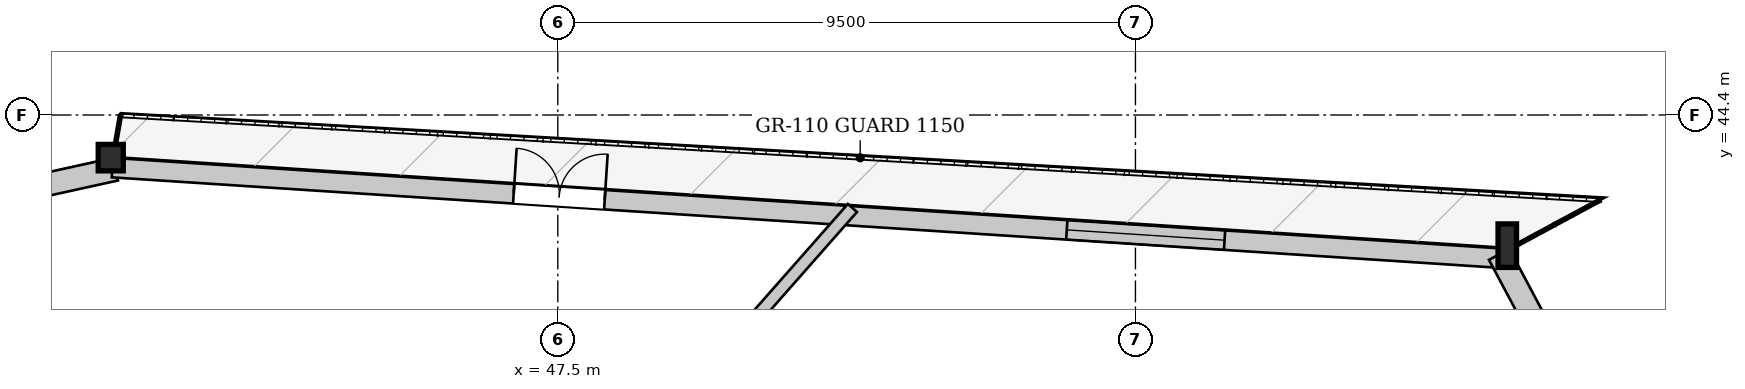
"""IFC4 building model, lengths in metres.
Left out: names, types, materials, properties, quantities, classifications, styles, units other than length and angle.
Written with IfcOpenShell. Run it as: python <this file> out.ifc"""

import sys

from ifc_helpers import new_model, si_unit, direction, frame, frame_2d, origin, origin_2d, place, context, subcontext, project, spatial, rectangle, i_section, extrude, source, transform, mapped, element, fill, save


model = new_model("IFC4")
c1 = context("Model", 3, precision=1e-05, world=origin(), true_north=direction((0.0, 1.0)))
c2 = subcontext(c1, "Body", "Model", "MODEL_VIEW")
j1 = project(units=[si_unit("LENGTHUNIT", "METRE"), si_unit("PLANEANGLEUNIT", "RADIAN")], contexts=[c1])
p1 = place(None, origin())
s1 = spatial("IfcSite", under=j1, at=p1, CompositionType="ELEMENT")
p2 = place(p1, origin())
s2 = spatial("IfcBuilding", under=s1, at=p2, CompositionType="ELEMENT")
p3 = place(p2, frame((0.0, 0.0, 150.15)))
s3 = spatial("IfcBuildingStorey", under=s2, at=p3, CompositionType="ELEMENT", Elevation=150.15)
m1 = source(origin(), c2, "Body", "SweptSolid", [
    extrude(i_section(OverallWidth=0.304, OverallDepth=0.716, WebThickness=0.021, FlangeThickness=0.04, at=origin_2d()), origin(), (0.0, 0.0, 1.0), 3.387),
])
p4 = place(p3, frame((63.149, 42.197, 0.0), z_axis=(-0.020108001466, 0.03236018874, 0.999273979678), x_axis=(-0.849377007505, -0.527786603773, 0.0)))
e1 = element("IfcColumn", 1, at=p4, inside=s3, PredefinedType="COLUMN", context=c2, shape_type="MappedRepresentation", body=[
    mapped(m1, transform((0.0, 0.0, 0.0), x_axis=(1.0, 0.0, 0.0), y_axis=(0.0, 1.0, 0.0), z_axis=(0.0, 0.0, 1.0), scale=1.0)),
])
m2 = source(origin(), c2, "Body", "SweptSolid", [
    extrude(i_section(OverallWidth=0.412, OverallDepth=0.435, WebThickness=0.031, FlangeThickness=0.05, at=origin_2d()), origin(), (0.0, 0.0, 1.0), 3.386),
])
p5 = place(p3, frame((40.185, 43.694, 0.0), z_axis=(-0.022064500096, 0.002812142169, 0.999752594241), x_axis=(-0.126428281923, -0.991975750475, 0.0)))
e2 = element("IfcColumn", 2, at=p5, inside=s3, PredefinedType="COLUMN", context=c2, shape_type="MappedRepresentation", body=[
    mapped(m2, transform((0.0, 0.0, 0.0), x_axis=(1.0, 0.0, 0.0), y_axis=(0.0, 1.0, 0.0), z_axis=(0.0, 0.0, 1.0), scale=1.0)),
])
p6 = place(p3, frame((17.752, 38.552, 0.0), z_axis=(0.0, 0.0, 1.0), x_axis=(0.976529056669, 0.215385703985, 0.0)))
e3 = element("IfcWall", 3, at=p6, inside=s3, PredefinedType="SOLIDWALL", context=c2, shape_type="SweptSolid", body=[
    extrude(rectangle(XDim=23.013, YDim=0.38, at=frame_2d((11.507, 0.0))), origin(), (0.0, 0.0, 1.0), 2.692),
])
p7 = place(p6, frame((5.344, 0.0, 0.322)))
e4 = element("IfcOpeningElement", 4, at=p7, cuts=e3, PredefinedType="OPENING", context=c2, shape_type="SweptSolid", body=[
    extrude(rectangle(XDim=2.2, YDim=2.25, at=frame_2d((1.1, 1.125))), frame((0.0, 0.2, 0.0), z_axis=(0.0, -1.0, 0.0), x_axis=(1.0, 0.0, 0.0)), (0.0, 0.0, 1.0), 0.4),
])
p8 = place(p6, frame((15.47, 0.0, 0.322)))
e5 = element("IfcOpeningElement", 5, at=p8, cuts=e3, PredefinedType="OPENING", context=c2, shape_type="SweptSolid", body=[
    extrude(rectangle(XDim=2.2, YDim=2.25, at=frame_2d((1.1, 1.125))), frame((0.0, 0.2, 0.0), z_axis=(0.0, -1.0, 0.0), x_axis=(1.0, 0.0, 0.0)), (0.0, 0.0, 1.0), 0.4),
])
p9 = place(p3, frame((40.174, 43.535, 0.0), z_axis=(0.0, 0.0, 1.0), x_axis=(0.997880525294, -0.065072707329, 0.0)))
e6 = element("IfcWall", 6, at=p9, inside=s3, PredefinedType="SOLIDWALL", context=c2, shape_type="SweptSolid", body=[
    extrude(rectangle(XDim=23.014, YDim=0.32, at=frame_2d((11.507, 0.0))), origin(), (0.0, 0.0, 1.0), 2.692),
])
p10 = place(p9, frame((6.614, 0.0, 0.0)))
e7 = element("IfcOpeningElement", 7, at=p10, cuts=e6, PredefinedType="OPENING", context=c2, shape_type="SweptSolid", body=[
    extrude(rectangle(XDim=1.5, YDim=2.3, at=frame_2d((0.75, 1.15))), frame((0.0, 0.17, 0.0), z_axis=(0.0, -1.0, 0.0), x_axis=(1.0, 0.0, 0.0)), (0.0, 0.0, 1.0), 0.34),
])
p11 = place(p9, frame((15.73, 0.0, 0.25)))
e8 = element("IfcOpeningElement", 8, at=p11, cuts=e6, PredefinedType="OPENING", context=c2, shape_type="SweptSolid", body=[
    extrude(rectangle(XDim=2.6, YDim=2.35, at=frame_2d((1.3, 1.175))), frame((0.0, 0.17, 0.0), z_axis=(0.0, -1.0, 0.0), x_axis=(1.0, 0.0, 0.0)), (0.0, 0.0, 1.0), 0.34),
])
p12 = place(p3, frame((62.982, 42.107, 0.0), z_axis=(0.0, 0.0, 1.0), x_axis=(0.47030337752, -0.882504806272, 0.0)))
e9 = element("IfcWall", 9, at=p12, inside=s3, PredefinedType="SOLIDWALL", context=c2, shape_type="SweptSolid", body=[
    extrude(rectangle(XDim=3.559, YDim=0.38, at=frame_2d((1.78, 0.0))), origin(), (0.0, 0.0, 1.0), 2.692),
])
p13 = place(p3, frame((46.463, 36.2, 0.0), z_axis=(0.0, 0.0, 1.0), x_axis=(0.661325616774, 0.750098945872, 0.0)))
e10 = element("IfcWall", 10, at=p13, inside=s3, PredefinedType="PARTITIONING", context=c2, shape_type="SweptSolid", body=[
    extrude(rectangle(XDim=8.894, YDim=0.2, at=frame_2d((4.447, 0.0))), origin(), (0.0, 0.0, 1.0), 3.3),
])
m3 = source(origin(), c2, "Body", "SweptSolid", [
    extrude(rectangle(XDim=1.5, YDim=2.3, at=frame_2d((0.75, 1.15))), frame((0.0, 0.025, 0.0), z_axis=(0.0, -1.0, 0.0), x_axis=(1.0, 0.0, 0.0)), (0.0, 0.0, 1.0), 0.05),
])
p14 = place(p10, origin())
e11 = element("IfcDoor", 11, at=p14, inside=s3, OperationType="DOUBLE_DOOR_SINGLE_SWING", PredefinedType="DOOR", context=c2, shape_type="MappedRepresentation", body=[
    mapped(m3, transform((0.0, 0.0, 0.0), x_axis=(1.0, 0.0, 0.0), y_axis=(0.0, 1.0, 0.0), z_axis=(0.0, 0.0, 1.0), scale=1.0)),
])
fill(e7, e11)
m4 = source(origin(), c2, "Body", "SweptSolid", [
    extrude(rectangle(XDim=2.6, YDim=2.35, at=frame_2d((1.3, 1.175))), frame((0.0, 0.03, 0.0), z_axis=(0.0, -1.0, 0.0), x_axis=(1.0, 0.0, 0.0)), (0.0, 0.0, 1.0), 0.06),
])
p15 = place(p11, origin())
e12 = element("IfcWindow", 12, at=p15, inside=s3, PartitioningType="SINGLE_PANEL", PredefinedType="WINDOW", context=c2, shape_type="MappedRepresentation", body=[
    mapped(m4, transform((0.0, 0.0, 0.0), x_axis=(1.0, 0.0, 0.0), y_axis=(0.0, 1.0, 0.0), z_axis=(0.0, 0.0, 1.0), scale=1.0)),
])
fill(e8, e12)
save(model, sys.argv[1])
